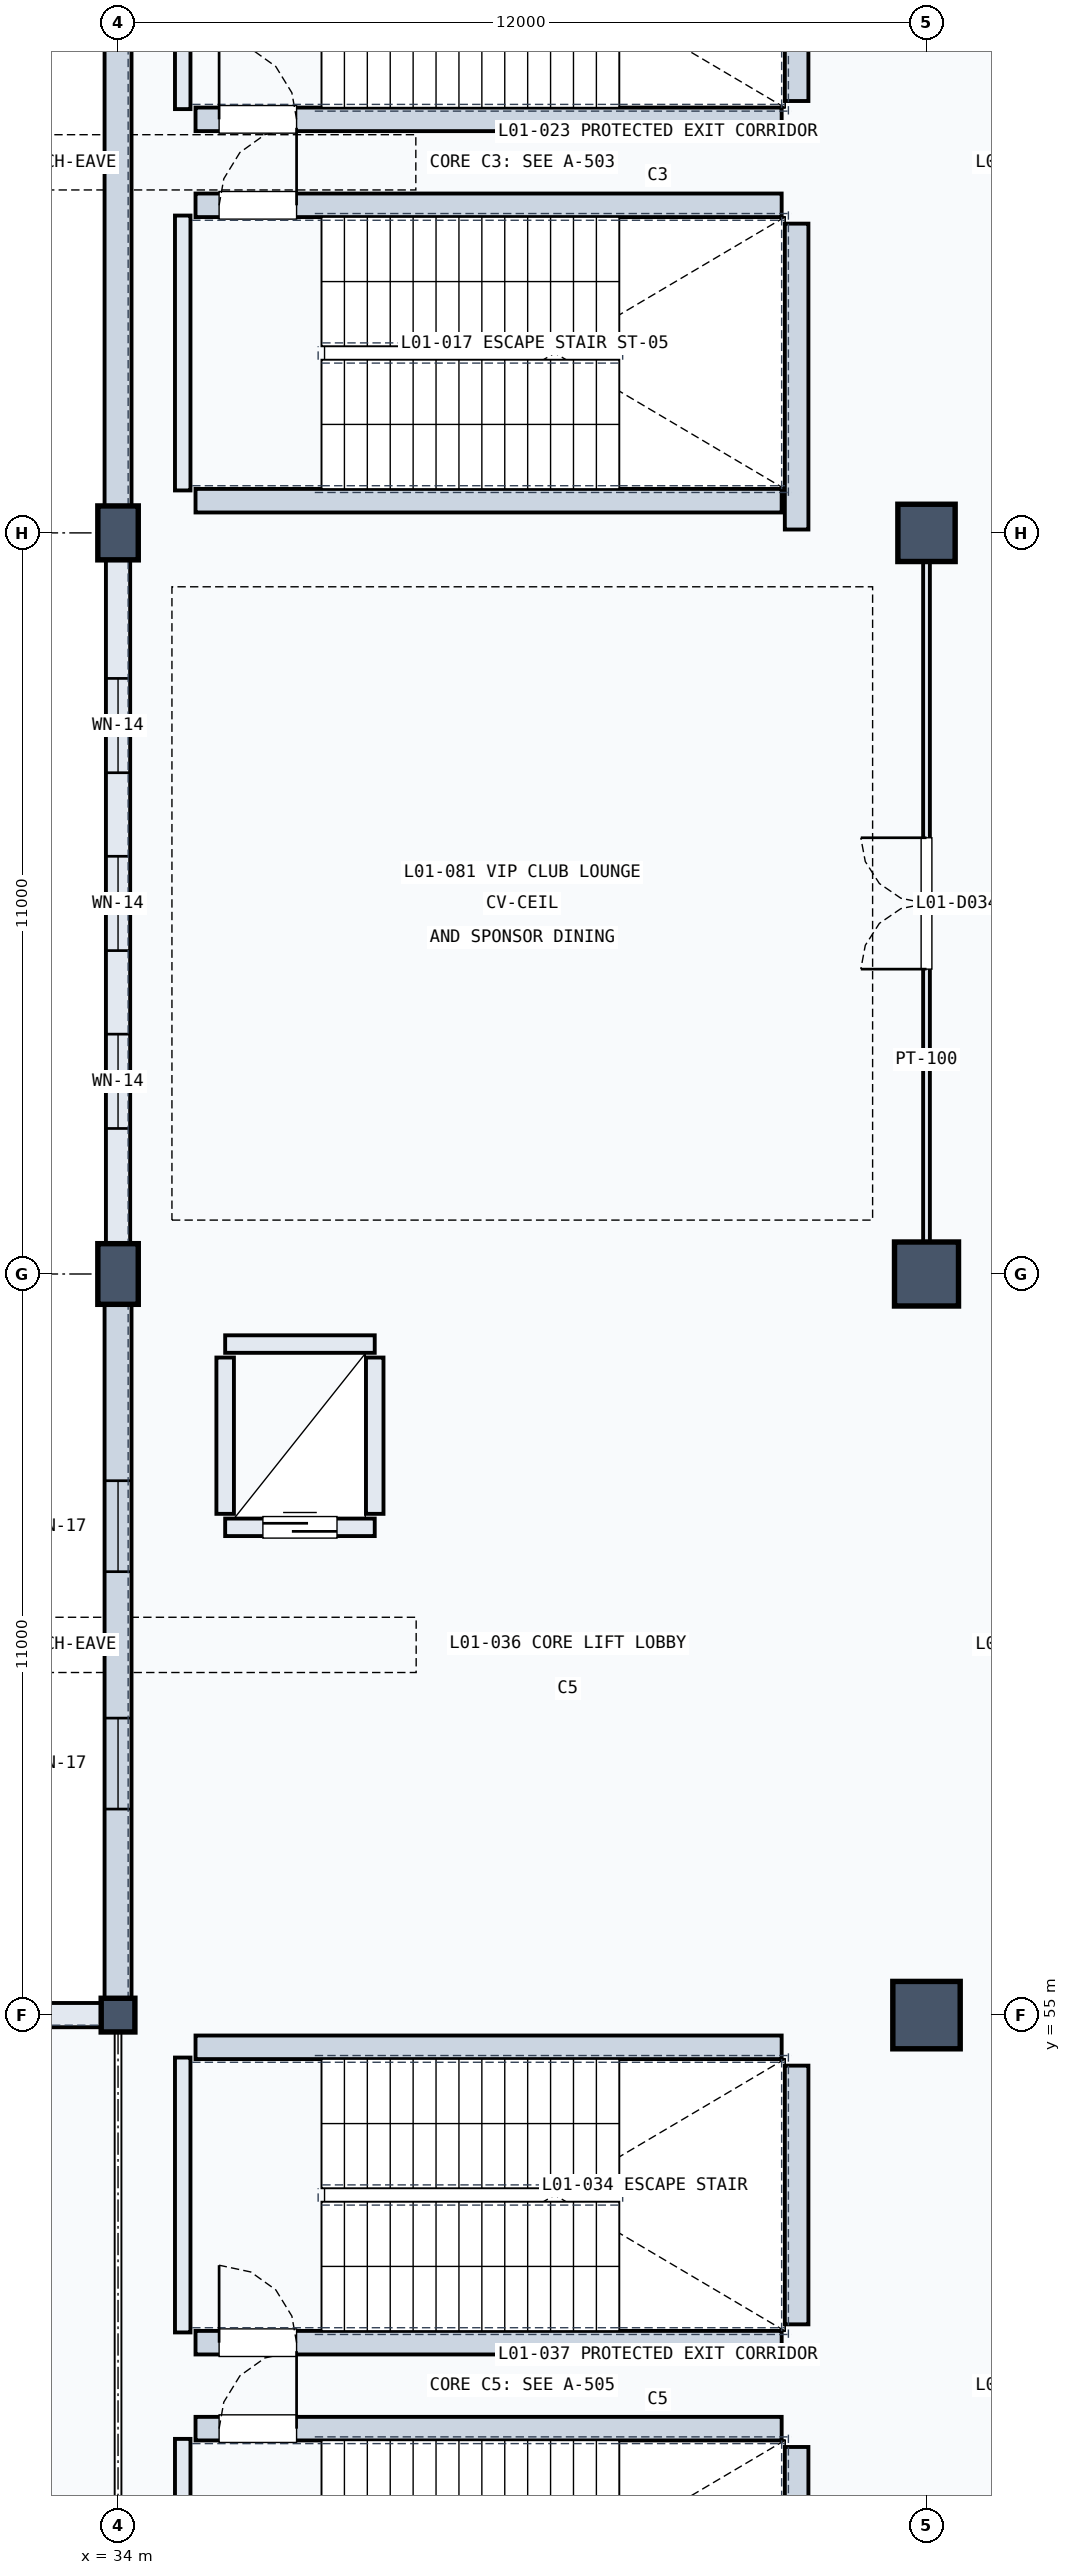
"""IFC4 building model, lengths in metres.
Left out: names, types, materials, properties, quantities, classifications, styles, units other than length and angle.
Written with IfcOpenShell. Run it as: python <this file> out.ifc"""

import sys

from ifc_helpers import new_model, si_unit, direction, frame, frame_2d, origin, origin_2d, place, context, subcontext, project, spatial, rectangle, extrude, element, fill, save


model = new_model("IFC4")
c1 = context("Model", 3, precision=1e-05, world=origin(), true_north=direction((0.0, 1.0)))
c2 = subcontext(c1, "Body", "Model", "MODEL_VIEW")
j1 = project(units=[si_unit("LENGTHUNIT", "METRE"), si_unit("PLANEANGLEUNIT", "RADIAN")], contexts=[c1])
p1 = place(None, origin())
s1 = spatial("IfcSite", under=j1, at=p1, CompositionType="ELEMENT")
p2 = place(p1, origin())
s2 = spatial("IfcBuilding", under=s1, at=p2, CompositionType="ELEMENT")
p3 = place(p2, frame((0.0, 0.0, 5.4)))
s3 = spatial("IfcBuildingStorey", under=s2, at=p3, CompositionType="ELEMENT", Elevation=5.4)
p4 = place(p3, frame((34.0, 55.0, 0.0), z_axis=(0.0, 0.0, 1.0), x_axis=(1.0, 0.0, 0.0)))
e1 = element("IfcColumn", 1, at=p4, inside=s3, PredefinedType="COLUMN", context=c2, shape_type="SweptSolid", body=[
    extrude(rectangle(XDim=0.5, YDim=0.5, at=origin_2d()), origin(), (0.0, 0.0, 1.0), 4.8),
])
p5 = place(p3, frame((34.0, 66.0, 0.0), z_axis=(0.0, 0.0, 1.0), x_axis=(1.0, 0.0, 0.0)))
e2 = element("IfcColumn", 2, at=p5, inside=s3, PredefinedType="COLUMN", context=c2, shape_type="SweptSolid", body=[
    extrude(rectangle(XDim=0.6, YDim=0.9, at=origin_2d()), origin(), (0.0, 0.0, 1.0), 4.8),
])
p6 = place(p3, frame((34.0, 77.0, 0.0), z_axis=(0.0, 0.0, 1.0), x_axis=(1.0, 0.0, 0.0)))
e3 = element("IfcColumn", 3, at=p6, inside=s3, PredefinedType="COLUMN", context=c2, shape_type="SweptSolid", body=[
    extrude(rectangle(XDim=0.6, YDim=0.8, at=origin_2d()), origin(), (0.0, 0.0, 1.0), 4.8),
])
p7 = place(p3, frame((46.0, 55.0, 0.0), z_axis=(0.0, 0.0, 1.0), x_axis=(1.0, 0.0, 0.0)))
e4 = element("IfcColumn", 4, at=p7, inside=s3, PredefinedType="COLUMN", context=c2, shape_type="SweptSolid", body=[
    extrude(rectangle(XDim=1.0, YDim=1.0, at=origin_2d()), origin(), (0.0, 0.0, 1.0), 4.8),
])
p8 = place(p3, frame((46.0, 66.0, 0.0), z_axis=(0.0, 0.0, 1.0), x_axis=(1.0, 0.0, 0.0)))
e5 = element("IfcColumn", 5, at=p8, inside=s3, PredefinedType="COLUMN", context=c2, shape_type="SweptSolid", body=[
    extrude(rectangle(XDim=0.95, YDim=0.95, at=origin_2d()), origin(), (0.0, 0.0, 1.0), 4.8),
])
p9 = place(p3, frame((46.0, 77.0, 0.0), z_axis=(0.0, 0.0, 1.0), x_axis=(1.0, 0.0, 0.0)))
e6 = element("IfcColumn", 6, at=p9, inside=s3, PredefinedType="COLUMN", context=c2, shape_type="SweptSolid", body=[
    extrude(rectangle(XDim=0.85, YDim=0.85, at=origin_2d()), origin(), (0.0, 0.0, 1.0), 4.8),
])
p10 = place(p3, frame((22.22, 55.0, 0.0), z_axis=(0.0, 0.0, 1.0), x_axis=(1.0, 0.0, 0.0)))
e7 = element("IfcWall", 7, at=p10, inside=s3, PredefinedType="SOLIDWALL", context=c2, shape_type="SweptSolid", body=[
    extrude(rectangle(XDim=11.57, YDim=0.36, at=frame_2d((5.785, 0.0))), origin(), (0.0, 0.0, 1.0), 3.49),
])
p11 = place(p10, frame((4.185, 0.0, 1.1)))
e8 = element("IfcOpeningElement", 8, at=p11, cuts=e7, PredefinedType="OPENING", context=c2, shape_type="SweptSolid", body=[
    extrude(rectangle(XDim=3.2, YDim=1.4, at=frame_2d((1.6, 0.7))), frame((0.0, 0.19, 0.0), z_axis=(0.0, -1.0, 0.0), x_axis=(1.0, 0.0, 0.0)), (0.0, 0.0, 1.0), 0.38),
])
p12 = place(p3, frame((34.0, 55.21, 0.0), z_axis=(0.0, 0.0, 1.0), x_axis=(0.0, 1.0, 0.0)))
e9 = element("IfcWall", 9, at=p12, inside=s3, PredefinedType="SOLIDWALL", context=c2, shape_type="SweptSolid", body=[
    extrude(rectangle(XDim=10.57, YDim=0.4, at=frame_2d((5.285, 0.0))), origin(), (0.0, 0.0, 1.0), 3.64),
])
p13 = place(p12, frame((2.848, 0.0, 0.8)))
e10 = element("IfcOpeningElement", 10, at=p13, cuts=e9, PredefinedType="OPENING", context=c2, shape_type="SweptSolid", body=[
    extrude(rectangle(XDim=1.35, YDim=2.1, at=frame_2d((0.675, 1.05))), frame((0.0, 0.21, 0.0), z_axis=(0.0, -1.0, 0.0), x_axis=(1.0, 0.0, 0.0)), (0.0, 0.0, 1.0), 0.42),
])
p14 = place(p12, frame((6.372, 0.0, 0.8)))
e11 = element("IfcOpeningElement", 11, at=p14, cuts=e9, PredefinedType="OPENING", context=c2, shape_type="SweptSolid", body=[
    extrude(rectangle(XDim=1.35, YDim=2.1, at=frame_2d((0.675, 1.05))), frame((0.0, 0.21, 0.0), z_axis=(0.0, -1.0, 0.0), x_axis=(1.0, 0.0, 0.0)), (0.0, 0.0, 1.0), 0.42),
])
p15 = place(p3, frame((34.0, 66.22, 0.0), z_axis=(0.0, 0.0, 1.0), x_axis=(0.0, 1.0, 0.0)))
e12 = element("IfcWall", 12, at=p15, inside=s3, PredefinedType="SOLIDWALL", context=c2, shape_type="SweptSolid", body=[
    extrude(rectangle(XDim=10.56, YDim=0.36, at=frame_2d((5.28, 0.0))), origin(), (0.0, 0.0, 1.0), 3.77),
])
p16 = place(p15, frame((1.94, 0.0, 0.95)))
e13 = element("IfcOpeningElement", 13, at=p16, cuts=e12, PredefinedType="OPENING", context=c2, shape_type="SweptSolid", body=[
    extrude(rectangle(XDim=1.4, YDim=1.5, at=frame_2d((0.7, 0.75))), frame((0.0, 0.19, 0.0), z_axis=(0.0, -1.0, 0.0), x_axis=(1.0, 0.0, 0.0)), (0.0, 0.0, 1.0), 0.38),
])
p17 = place(p15, frame((4.58, 0.0, 0.95)))
e14 = element("IfcOpeningElement", 14, at=p17, cuts=e12, PredefinedType="OPENING", context=c2, shape_type="SweptSolid", body=[
    extrude(rectangle(XDim=1.4, YDim=1.5, at=frame_2d((0.7, 0.75))), frame((0.0, 0.19, 0.0), z_axis=(0.0, -1.0, 0.0), x_axis=(1.0, 0.0, 0.0)), (0.0, 0.0, 1.0), 0.38),
])
p18 = place(p15, frame((7.22, 0.0, 0.95)))
e15 = element("IfcOpeningElement", 15, at=p18, cuts=e12, PredefinedType="OPENING", context=c2, shape_type="SweptSolid", body=[
    extrude(rectangle(XDim=1.4, YDim=1.5, at=frame_2d((0.7, 0.75))), frame((0.0, 0.19, 0.0), z_axis=(0.0, -1.0, 0.0), x_axis=(1.0, 0.0, 0.0)), (0.0, 0.0, 1.0), 0.38),
])
p19 = place(p3, frame((34.0, 77.22, 0.0), z_axis=(0.0, 0.0, 1.0), x_axis=(0.0, 1.0, 0.0)))
e16 = element("IfcWall", 16, at=p19, inside=s3, PredefinedType="SOLIDWALL", context=c2, shape_type="SweptSolid", body=[
    extrude(rectangle(XDim=10.56, YDim=0.4, at=frame_2d((5.28, 0.0))), origin(), (0.0, 0.0, 1.0), 3.77),
])
p20 = place(p3, frame((34.96, 77.63, 0.0), z_axis=(0.0, 0.0, 1.0), x_axis=(0.0, 1.0, 0.0)))
e17 = element("IfcWall", 17, at=p20, inside=s3, PredefinedType="SOLIDWALL", context=c2, shape_type="SweptSolid", body=[
    extrude(rectangle(XDim=4.08, YDim=0.23, at=frame_2d((2.04, 0.0))), origin(), (0.0, 0.0, 1.0), 3.79),
])
p21 = place(p3, frame((44.072, 77.05, 0.0), z_axis=(0.0, 0.0, 1.0), x_axis=(0.0, 1.0, 0.0)))
e18 = element("IfcWall", 18, at=p21, inside=s3, PredefinedType="SOLIDWALL", context=c2, shape_type="SweptSolid", body=[
    extrude(rectangle(XDim=4.54, YDim=0.35, at=frame_2d((2.27, 0.0))), origin(), (0.0, 0.0, 1.0), 4.46),
])
p22 = place(p3, frame((35.15, 77.478, 0.0), z_axis=(0.0, 0.0, 1.0), x_axis=(1.0, 0.0, 0.0)))
e19 = element("IfcWall", 19, at=p22, inside=s3, PredefinedType="SOLIDWALL", context=c2, shape_type="SweptSolid", body=[
    extrude(rectangle(XDim=8.7, YDim=0.35, at=frame_2d((4.35, 0.0))), origin(), (0.0, 0.0, 1.0), 4.46),
])
p23 = place(p3, frame((35.15, 81.862, 0.0), z_axis=(0.0, 0.0, 1.0), x_axis=(1.0, 0.0, 0.0)))
e20 = element("IfcWall", 20, at=p23, inside=s3, PredefinedType="SOLIDWALL", context=c2, shape_type="SweptSolid", body=[
    extrude(rectangle(XDim=8.7, YDim=0.35, at=frame_2d((4.35, 0.0))), origin(), (0.0, 0.0, 1.0), 4.46),
])
p24 = place(p23, frame((0.35, 0.0, 0.0)))
e21 = element("IfcOpeningElement", 21, at=p24, cuts=e20, PredefinedType="OPENING", context=c2, shape_type="SweptSolid", body=[
    extrude(rectangle(XDim=1.15, YDim=2.2, at=frame_2d((0.575, 1.1))), frame((0.0, 0.185, 0.0), z_axis=(0.0, -1.0, 0.0), x_axis=(1.0, 0.0, 0.0)), (0.0, 0.0, 1.0), 0.37),
])
p25 = place(p3, frame((34.96, 83.29, 0.0), z_axis=(0.0, 0.0, 1.0), x_axis=(0.0, 1.0, 0.0)))
e22 = element("IfcWall", 22, at=p25, inside=s3, PredefinedType="SOLIDWALL", context=c2, shape_type="SweptSolid", body=[
    extrude(rectangle(XDim=4.08, YDim=0.23, at=frame_2d((2.04, 0.0))), origin(), (0.0, 0.0, 1.0), 3.79),
])
p26 = place(p3, frame((44.072, 83.41, 0.0), z_axis=(0.0, 0.0, 1.0), x_axis=(0.0, 1.0, 0.0)))
e23 = element("IfcWall", 23, at=p26, inside=s3, PredefinedType="SOLIDWALL", context=c2, shape_type="SweptSolid", body=[
    extrude(rectangle(XDim=3.84, YDim=0.35, at=frame_2d((1.92, 0.0))), origin(), (0.0, 0.0, 1.0), 4.46),
])
p27 = place(p3, frame((35.15, 83.138, 0.0), z_axis=(0.0, 0.0, 1.0), x_axis=(1.0, 0.0, 0.0)))
e24 = element("IfcWall", 24, at=p27, inside=s3, PredefinedType="SOLIDWALL", context=c2, shape_type="SweptSolid", body=[
    extrude(rectangle(XDim=8.7, YDim=0.35, at=frame_2d((4.35, 0.0))), origin(), (0.0, 0.0, 1.0), 4.46),
])
p28 = place(p27, frame((0.35, 0.0, 0.0)))
e25 = element("IfcOpeningElement", 25, at=p28, cuts=e24, PredefinedType="OPENING", context=c2, shape_type="SweptSolid", body=[
    extrude(rectangle(XDim=1.15, YDim=2.2, at=frame_2d((0.575, 1.1))), frame((0.0, 0.185, 0.0), z_axis=(0.0, -1.0, 0.0), x_axis=(1.0, 0.0, 0.0)), (0.0, 0.0, 1.0), 0.37),
])
p29 = place(p3, frame((34.96, 44.63, 0.0), z_axis=(0.0, 0.0, 1.0), x_axis=(0.0, 1.0, 0.0)))
e26 = element("IfcWall", 26, at=p29, inside=s3, PredefinedType="SOLIDWALL", context=c2, shape_type="SweptSolid", body=[
    extrude(rectangle(XDim=4.08, YDim=0.23, at=frame_2d((2.04, 0.0))), origin(), (0.0, 0.0, 1.0), 3.79),
])
p30 = place(p3, frame((44.072, 44.05, 0.0), z_axis=(0.0, 0.0, 1.0), x_axis=(0.0, 1.0, 0.0)))
e27 = element("IfcWall", 27, at=p30, inside=s3, PredefinedType="SOLIDWALL", context=c2, shape_type="SweptSolid", body=[
    extrude(rectangle(XDim=4.54, YDim=0.35, at=frame_2d((2.27, 0.0))), origin(), (0.0, 0.0, 1.0), 4.46),
])
p31 = place(p3, frame((35.15, 48.862, 0.0), z_axis=(0.0, 0.0, 1.0), x_axis=(1.0, 0.0, 0.0)))
e28 = element("IfcWall", 28, at=p31, inside=s3, PredefinedType="SOLIDWALL", context=c2, shape_type="SweptSolid", body=[
    extrude(rectangle(XDim=8.7, YDim=0.35, at=frame_2d((4.35, 0.0))), origin(), (0.0, 0.0, 1.0), 4.46),
])
p32 = place(p31, frame((0.35, 0.0, 0.0)))
e29 = element("IfcOpeningElement", 29, at=p32, cuts=e28, PredefinedType="OPENING", context=c2, shape_type="SweptSolid", body=[
    extrude(rectangle(XDim=1.15, YDim=2.2, at=frame_2d((0.575, 1.1))), frame((0.0, 0.185, 0.0), z_axis=(0.0, -1.0, 0.0), x_axis=(1.0, 0.0, 0.0)), (0.0, 0.0, 1.0), 0.37),
])
p33 = place(p3, frame((34.96, 50.29, 0.0), z_axis=(0.0, 0.0, 1.0), x_axis=(0.0, 1.0, 0.0)))
e30 = element("IfcWall", 30, at=p33, inside=s3, PredefinedType="SOLIDWALL", context=c2, shape_type="SweptSolid", body=[
    extrude(rectangle(XDim=4.08, YDim=0.23, at=frame_2d((2.04, 0.0))), origin(), (0.0, 0.0, 1.0), 3.79),
])
p34 = place(p3, frame((44.072, 50.41, 0.0), z_axis=(0.0, 0.0, 1.0), x_axis=(0.0, 1.0, 0.0)))
e31 = element("IfcWall", 31, at=p34, inside=s3, PredefinedType="SOLIDWALL", context=c2, shape_type="SweptSolid", body=[
    extrude(rectangle(XDim=3.84, YDim=0.35, at=frame_2d((1.92, 0.0))), origin(), (0.0, 0.0, 1.0), 4.46),
])
p35 = place(p3, frame((35.15, 50.138, 0.0), z_axis=(0.0, 0.0, 1.0), x_axis=(1.0, 0.0, 0.0)))
e32 = element("IfcWall", 32, at=p35, inside=s3, PredefinedType="SOLIDWALL", context=c2, shape_type="SweptSolid", body=[
    extrude(rectangle(XDim=8.7, YDim=0.35, at=frame_2d((4.35, 0.0))), origin(), (0.0, 0.0, 1.0), 4.46),
])
p36 = place(p35, frame((0.35, 0.0, 0.0)))
e33 = element("IfcOpeningElement", 33, at=p36, cuts=e32, PredefinedType="OPENING", context=c2, shape_type="SweptSolid", body=[
    extrude(rectangle(XDim=1.15, YDim=2.2, at=frame_2d((0.575, 1.1))), frame((0.0, 0.185, 0.0), z_axis=(0.0, -1.0, 0.0), x_axis=(1.0, 0.0, 0.0)), (0.0, 0.0, 1.0), 0.37),
])
p37 = place(p3, frame((35.15, 54.522, 0.0), z_axis=(0.0, 0.0, 1.0), x_axis=(1.0, 0.0, 0.0)))
e34 = element("IfcWall", 34, at=p37, inside=s3, PredefinedType="SOLIDWALL", context=c2, shape_type="SweptSolid", body=[
    extrude(rectangle(XDim=8.7, YDim=0.35, at=frame_2d((4.35, 0.0))), origin(), (0.0, 0.0, 1.0), 4.46),
])
p38 = place(p3, frame((35.59, 62.24, 0.0), z_axis=(0.0, 0.0, 1.0), x_axis=(1.0, 0.0, 0.0)))
e35 = element("IfcWall", 35, at=p38, inside=s3, PredefinedType="SOLIDWALL", context=c2, shape_type="SweptSolid", body=[
    extrude(rectangle(XDim=2.22, YDim=0.26, at=frame_2d((1.11, 0.0))), origin(), (0.0, 0.0, 1.0), 4.46),
])
p39 = place(p38, frame((0.56, 0.0, 0.0)))
e36 = element("IfcOpeningElement", 36, at=p39, cuts=e35, PredefinedType="OPENING", context=c2, shape_type="SweptSolid", body=[
    extrude(rectangle(XDim=1.1, YDim=2.15, at=frame_2d((0.55, 1.075))), frame((0.0, 0.14, 0.0), z_axis=(0.0, -1.0, 0.0), x_axis=(1.0, 0.0, 0.0)), (0.0, 0.0, 1.0), 0.28),
])
p40 = place(p3, frame((35.59, 64.96, 0.0), z_axis=(0.0, 0.0, 1.0), x_axis=(1.0, 0.0, 0.0)))
e37 = element("IfcWall", 37, at=p40, inside=s3, PredefinedType="SOLIDWALL", context=c2, shape_type="SweptSolid", body=[
    extrude(rectangle(XDim=2.22, YDim=0.26, at=frame_2d((1.11, 0.0))), origin(), (0.0, 0.0, 1.0), 4.46),
])
for number, where, z_axis, x_axis in (
    (38, (35.59, 62.44, 0.0), (0.0, 0.0, 1.0), (0.0, 1.0, 0.0)),
    (39, (37.81, 62.44, 0.0), (0.0, 0.0, 1.0), (0.0, 1.0, 0.0)),
):
    element("IfcWall", number, at=place(p3, frame(where, z_axis=z_axis, x_axis=x_axis)), inside=s3, PredefinedType="SOLIDWALL", context=c2, shape_type="SweptSolid", body=[
        extrude(rectangle(XDim=2.32, YDim=0.26, at=frame_2d((1.16, 0.0))), origin(), (0.0, 0.0, 1.0), 4.46),
    ])
p41 = place(p3, frame((46.0, 66.22, 0.0), z_axis=(0.0, 0.0, 1.0), x_axis=(0.0, 1.0, 0.0)))
e40 = element("IfcWall", 40, at=p41, inside=s3, PredefinedType="PARTITIONING", context=c2, shape_type="SweptSolid", body=[
    extrude(rectangle(XDim=10.56, YDim=0.1, at=frame_2d((5.28, 0.0))), origin(), (0.0, 0.0, 1.0), 3.707),
])
p42 = place(p41, frame((4.305, 0.0, 0.0)))
e41 = element("IfcOpeningElement", 41, at=p42, cuts=e40, PredefinedType="OPENING", context=c2, shape_type="SweptSolid", body=[
    extrude(rectangle(XDim=1.95, YDim=2.4, at=frame_2d((0.975, 1.2))), frame((0.0, 0.06, 0.0), z_axis=(0.0, -1.0, 0.0), x_axis=(1.0, 0.0, 0.0)), (0.0, 0.0, 1.0), 0.12),
])
p43 = place(p13, origin())
e42 = element("IfcWindow", 42, at=p43, inside=s3, PartitioningType="SINGLE_PANEL", PredefinedType="WINDOW", context=c2, shape_type="SweptSolid", body=[
    extrude(rectangle(XDim=1.35, YDim=2.1, at=frame_2d((0.675, 1.05))), frame((0.0, 0.03, 0.0), z_axis=(0.0, -1.0, 0.0), x_axis=(1.0, 0.0, 0.0)), (0.0, 0.0, 1.0), 0.06),
])
fill(e10, e42)
p44 = place(p14, origin())
e43 = element("IfcWindow", 43, at=p44, inside=s3, PartitioningType="SINGLE_PANEL", PredefinedType="WINDOW", context=c2, shape_type="SweptSolid", body=[
    extrude(rectangle(XDim=1.35, YDim=2.1, at=frame_2d((0.675, 1.05))), frame((0.0, 0.03, 0.0), z_axis=(0.0, -1.0, 0.0), x_axis=(1.0, 0.0, 0.0)), (0.0, 0.0, 1.0), 0.06),
])
fill(e11, e43)
p45 = place(p16, origin())
e44 = element("IfcWindow", 44, at=p45, inside=s3, PartitioningType="SINGLE_PANEL", PredefinedType="WINDOW", context=c2, shape_type="SweptSolid", body=[
    extrude(rectangle(XDim=1.4, YDim=1.5, at=frame_2d((0.7, 0.75))), frame((0.0, 0.03, 0.0), z_axis=(0.0, -1.0, 0.0), x_axis=(1.0, 0.0, 0.0)), (0.0, 0.0, 1.0), 0.06),
])
fill(e13, e44)
p46 = place(p17, origin())
e45 = element("IfcWindow", 45, at=p46, inside=s3, PartitioningType="SINGLE_PANEL", PredefinedType="WINDOW", context=c2, shape_type="SweptSolid", body=[
    extrude(rectangle(XDim=1.4, YDim=1.5, at=frame_2d((0.7, 0.75))), frame((0.0, 0.03, 0.0), z_axis=(0.0, -1.0, 0.0), x_axis=(1.0, 0.0, 0.0)), (0.0, 0.0, 1.0), 0.06),
])
fill(e14, e45)
p47 = place(p18, origin())
e46 = element("IfcWindow", 46, at=p47, inside=s3, PartitioningType="SINGLE_PANEL", PredefinedType="WINDOW", context=c2, shape_type="SweptSolid", body=[
    extrude(rectangle(XDim=1.4, YDim=1.5, at=frame_2d((0.7, 0.75))), frame((0.0, 0.03, 0.0), z_axis=(0.0, -1.0, 0.0), x_axis=(1.0, 0.0, 0.0)), (0.0, 0.0, 1.0), 0.06),
])
fill(e15, e46)
p48 = place(p24, origin())
e47 = element("IfcDoor", 47, at=p48, inside=s3, OperationType="SINGLE_SWING_RIGHT", PredefinedType="DOOR", context=c2, shape_type="SweptSolid", body=[
    extrude(rectangle(XDim=1.15, YDim=2.2, at=frame_2d((0.575, 1.1))), frame((0.0, 0.025, 0.0), z_axis=(0.0, -1.0, 0.0), x_axis=(1.0, 0.0, 0.0)), (0.0, 0.0, 1.0), 0.05),
])
fill(e21, e47)
p49 = place(p28, origin())
e48 = element("IfcDoor", 48, at=p49, inside=s3, OperationType="SINGLE_SWING_LEFT", PredefinedType="DOOR", context=c2, shape_type="SweptSolid", body=[
    extrude(rectangle(XDim=1.15, YDim=2.2, at=frame_2d((0.575, 1.1))), frame((0.0, 0.025, 0.0), z_axis=(0.0, -1.0, 0.0), x_axis=(1.0, 0.0, 0.0)), (0.0, 0.0, 1.0), 0.05),
])
fill(e25, e48)
p50 = place(p32, origin())
e49 = element("IfcDoor", 49, at=p50, inside=s3, OperationType="SINGLE_SWING_RIGHT", PredefinedType="DOOR", context=c2, shape_type="SweptSolid", body=[
    extrude(rectangle(XDim=1.15, YDim=2.2, at=frame_2d((0.575, 1.1))), frame((0.0, 0.025, 0.0), z_axis=(0.0, -1.0, 0.0), x_axis=(1.0, 0.0, 0.0)), (0.0, 0.0, 1.0), 0.05),
])
fill(e29, e49)
p51 = place(p36, origin())
e50 = element("IfcDoor", 50, at=p51, inside=s3, OperationType="SINGLE_SWING_LEFT", PredefinedType="DOOR", context=c2, shape_type="SweptSolid", body=[
    extrude(rectangle(XDim=1.15, YDim=2.2, at=frame_2d((0.575, 1.1))), frame((0.0, 0.025, 0.0), z_axis=(0.0, -1.0, 0.0), x_axis=(1.0, 0.0, 0.0)), (0.0, 0.0, 1.0), 0.05),
])
fill(e33, e50)
p52 = place(p39, origin())
e51 = element("IfcDoor", 51, at=p52, inside=s3, OperationType="SLIDING_TO_LEFT", PredefinedType="DOOR", context=c2, shape_type="SweptSolid", body=[
    extrude(rectangle(XDim=1.1, YDim=2.15, at=frame_2d((0.55, 1.075))), frame((0.0, 0.025, 0.0), z_axis=(0.0, -1.0, 0.0), x_axis=(1.0, 0.0, 0.0)), (0.0, 0.0, 1.0), 0.05),
])
fill(e36, e51)
p53 = place(p42, origin())
e52 = element("IfcDoor", 52, at=p53, inside=s3, OperationType="DOUBLE_DOOR_SINGLE_SWING", PredefinedType="DOOR", context=c2, shape_type="SweptSolid", body=[
    extrude(rectangle(XDim=1.95, YDim=2.4, at=frame_2d((0.975, 1.2))), frame((0.0, 0.025, 0.0), z_axis=(0.0, -1.0, 0.0), x_axis=(1.0, 0.0, 0.0)), (0.0, 0.0, 1.0), 0.05),
])
fill(e41, e52)
save(model, sys.argv[1])
